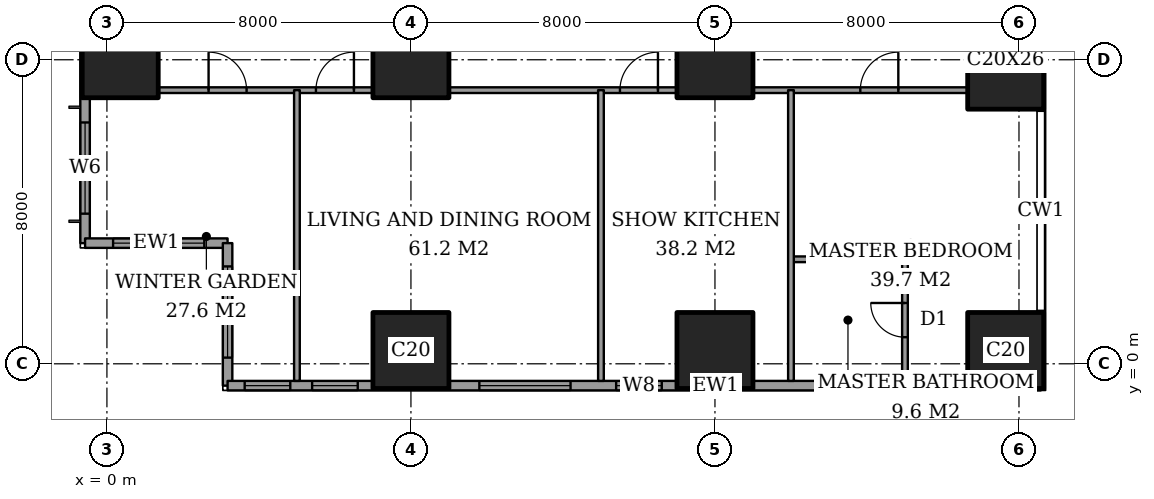
"""IFC4 building model, lengths in metres.
Left out: names, types, materials, properties, quantities, classifications, styles, units other than length and angle.
Written with IfcOpenShell. Run it as: python <this file> out.ifc"""

import sys

from ifc_helpers import new_model, si_unit, direction, frame, frame_2d, origin, origin_2d, place, context, subcontext, project, spatial, rectangle, extrude, element, fill, save


model = new_model("IFC4")
c1 = context("Model", 3, precision=1e-05, world=origin(), true_north=direction((0.0, 1.0)))
c2 = subcontext(c1, "Body", "Model", "MODEL_VIEW")
j1 = project(units=[si_unit("LENGTHUNIT", "METRE"), si_unit("PLANEANGLEUNIT", "RADIAN")], contexts=[c1])
p1 = place(None, origin())
s1 = spatial("IfcSite", under=j1, at=p1, CompositionType="ELEMENT")
p2 = place(p1, origin())
s2 = spatial("IfcBuilding", under=s1, at=p2, CompositionType="ELEMENT")
p3 = place(p2, frame((0.0, 0.0, 62.0)))
s3 = spatial("IfcBuildingStorey", under=s2, at=p3, CompositionType="ELEMENT", Elevation=62.0)
for number, where, z_axis, x_axis in (
    (1, (0.35, 8.0, 0.0), (0.0, 0.0, 1.0), (1.0, 0.0, 0.0)),
    (2, (8.0, 0.35, 0.0), (0.0, 0.0, 1.0), (1.0, 0.0, 0.0)),
    (3, (8.0, 8.0, 0.0), (0.0, 0.0, 1.0), (1.0, 0.0, 0.0)),
    (4, (16.0, 0.35, 0.0), (0.0, 0.0, 1.0), (1.0, 0.0, 0.0)),
    (5, (16.0, 8.0, 0.0), (0.0, 0.0, 1.0), (1.0, 0.0, 0.0)),
    (6, (23.65, 0.35, 0.0), (0.0, 0.0, 1.0), (1.0, 0.0, 0.0)),
):
    element("IfcColumn", number, at=place(p3, frame(where, z_axis=z_axis, x_axis=x_axis)), inside=s3, PredefinedType="COLUMN", context=c2, shape_type="SweptSolid", body=[
        extrude(rectangle(XDim=2.0, YDim=2.0, at=origin_2d()), origin(), (0.0, 0.0, 1.0), 3.6),
    ])
p4 = place(p3, frame((23.65, 8.0, 0.0), z_axis=(0.0, 0.0, 1.0), x_axis=(1.0, 0.0, 0.0)))
e7 = element("IfcColumn", 7, at=p4, inside=s3, PredefinedType="COLUMN", context=c2, shape_type="SweptSolid", body=[
    extrude(rectangle(XDim=2.0, YDim=2.6, at=origin_2d()), origin(), (0.0, 0.0, 1.0), 3.6),
])
p5 = place(p3, frame((-0.575, 44.825, 0.0), z_axis=(0.0, 0.0, 1.0), x_axis=(0.0, -1.0, 0.0)))
e8 = element("IfcWall", 8, at=p5, inside=s3, PredefinedType="SOLIDWALL", context=c2, shape_type="SweptSolid", body=[
    extrude(rectangle(XDim=41.65, YDim=0.25, at=frame_2d((20.825, 0.0))), origin(), (0.0, 0.0, 1.0), 3.6),
])
p6 = place(p5, frame((0.775, 0.0, 0.6)))
e9 = element("IfcOpeningElement", 9, at=p6, cuts=e8, PredefinedType="OPENING", context=c2, shape_type="SweptSolid", body=[
    extrude(rectangle(XDim=2.4, YDim=2.0, at=frame_2d((1.2, 1.0))), frame((0.0, 0.135, 0.0), z_axis=(0.0, -1.0, 0.0), x_axis=(1.0, 0.0, 0.0)), (0.0, 0.0, 1.0), 0.27),
])
p7 = place(p5, frame((6.1, 0.0, 0.6)))
e10 = element("IfcOpeningElement", 10, at=p7, cuts=e8, PredefinedType="OPENING", context=c2, shape_type="SweptSolid", body=[
    extrude(rectangle(XDim=1.2, YDim=2.0, at=frame_2d((0.6, 1.0))), frame((0.0, 0.135, 0.0), z_axis=(0.0, -1.0, 0.0), x_axis=(1.0, 0.0, 0.0)), (0.0, 0.0, 1.0), 0.27),
])
p8 = place(p5, frame((8.425, 0.0, 0.6)))
e11 = element("IfcOpeningElement", 11, at=p8, cuts=e8, PredefinedType="OPENING", context=c2, shape_type="SweptSolid", body=[
    extrude(rectangle(XDim=2.4, YDim=2.0, at=frame_2d((1.2, 1.0))), frame((0.0, 0.135, 0.0), z_axis=(0.0, -1.0, 0.0), x_axis=(1.0, 0.0, 0.0)), (0.0, 0.0, 1.0), 0.27),
])
p9 = place(p5, frame((15.625, 0.0, 0.6)))
e12 = element("IfcOpeningElement", 12, at=p9, cuts=e8, PredefinedType="OPENING", context=c2, shape_type="SweptSolid", body=[
    extrude(rectangle(XDim=2.4, YDim=2.0, at=frame_2d((1.2, 1.0))), frame((0.0, 0.135, 0.0), z_axis=(0.0, -1.0, 0.0), x_axis=(1.0, 0.0, 0.0)), (0.0, 0.0, 1.0), 0.27),
])
p10 = place(p5, frame((23.625, 0.0, 0.6)))
e13 = element("IfcOpeningElement", 13, at=p10, cuts=e8, PredefinedType="OPENING", context=c2, shape_type="SweptSolid", body=[
    extrude(rectangle(XDim=2.4, YDim=2.0, at=frame_2d((1.2, 1.0))), frame((0.0, 0.135, 0.0), z_axis=(0.0, -1.0, 0.0), x_axis=(1.0, 0.0, 0.0)), (0.0, 0.0, 1.0), 0.27),
])
p11 = place(p5, frame((30.825, 0.0, 0.6)))
e14 = element("IfcOpeningElement", 14, at=p11, cuts=e8, PredefinedType="OPENING", context=c2, shape_type="SweptSolid", body=[
    extrude(rectangle(XDim=2.4, YDim=2.0, at=frame_2d((1.2, 1.0))), frame((0.0, 0.135, 0.0), z_axis=(0.0, -1.0, 0.0), x_axis=(1.0, 0.0, 0.0)), (0.0, 0.0, 1.0), 0.27),
])
p12 = place(p5, frame((34.5, 0.0, 0.6)))
e15 = element("IfcOpeningElement", 15, at=p12, cuts=e8, PredefinedType="OPENING", context=c2, shape_type="SweptSolid", body=[
    extrude(rectangle(XDim=1.2, YDim=2.0, at=frame_2d((0.6, 1.0))), frame((0.0, 0.135, 0.0), z_axis=(0.0, -1.0, 0.0), x_axis=(1.0, 0.0, 0.0)), (0.0, 0.0, 1.0), 0.27),
])
p13 = place(p5, frame((38.475, 0.0, 0.6)))
e16 = element("IfcOpeningElement", 16, at=p13, cuts=e8, PredefinedType="OPENING", context=c2, shape_type="SweptSolid", body=[
    extrude(rectangle(XDim=2.4, YDim=2.0, at=frame_2d((1.2, 1.0))), frame((0.0, 0.135, 0.0), z_axis=(0.0, -1.0, 0.0), x_axis=(1.0, 0.0, 0.0)), (0.0, 0.0, 1.0), 0.27),
])
p14 = place(p3, frame((-0.575, 3.175, 0.0), z_axis=(0.0, 0.0, 1.0), x_axis=(1.0, 0.0, 0.0)))
e17 = element("IfcWall", 17, at=p14, inside=s3, PredefinedType="SOLIDWALL", context=c2, shape_type="SweptSolid", body=[
    extrude(rectangle(XDim=3.75, YDim=0.25, at=frame_2d((1.875, 0.0))), origin(), (0.0, 0.0, 1.0), 3.6),
])
p15 = place(p14, frame((0.738, 0.0, 0.6)))
e18 = element("IfcOpeningElement", 18, at=p15, cuts=e17, PredefinedType="OPENING", context=c2, shape_type="SweptSolid", body=[
    extrude(rectangle(XDim=2.4, YDim=2.0, at=frame_2d((1.2, 1.0))), frame((0.0, 0.135, 0.0), z_axis=(0.0, -1.0, 0.0), x_axis=(1.0, 0.0, 0.0)), (0.0, 0.0, 1.0), 0.27),
])
p16 = place(p3, frame((3.175, 3.175, 0.0), z_axis=(0.0, 0.0, 1.0), x_axis=(0.0, -1.0, 0.0)))
e19 = element("IfcWall", 19, at=p16, inside=s3, PredefinedType="SOLIDWALL", context=c2, shape_type="SweptSolid", body=[
    extrude(rectangle(XDim=3.75, YDim=0.25, at=frame_2d((1.875, 0.0))), origin(), (0.0, 0.0, 1.0), 3.6),
])
p17 = place(p16, frame((0.613, 0.0, 0.6)))
e20 = element("IfcOpeningElement", 20, at=p17, cuts=e19, PredefinedType="OPENING", context=c2, shape_type="SweptSolid", body=[
    extrude(rectangle(XDim=2.4, YDim=2.0, at=frame_2d((1.2, 1.0))), frame((0.0, 0.135, 0.0), z_axis=(0.0, -1.0, 0.0), x_axis=(1.0, 0.0, 0.0)), (0.0, 0.0, 1.0), 0.27),
])
p18 = place(p3, frame((3.175, -0.575, 0.0), z_axis=(0.0, 0.0, 1.0), x_axis=(1.0, 0.0, 0.0)))
e21 = element("IfcWall", 21, at=p18, inside=s3, PredefinedType="SOLIDWALL", context=c2, shape_type="SweptSolid", body=[
    extrude(rectangle(XDim=21.4, YDim=0.25, at=frame_2d((10.7, 0.0))), origin(), (0.0, 0.0, 1.0), 3.6),
])
p19 = place(p18, frame((0.45, 0.0, 0.6)))
e22 = element("IfcOpeningElement", 22, at=p19, cuts=e21, PredefinedType="OPENING", context=c2, shape_type="SweptSolid", body=[
    extrude(rectangle(XDim=1.2, YDim=2.0, at=frame_2d((0.6, 1.0))), frame((0.0, 0.135, 0.0), z_axis=(0.0, -1.0, 0.0), x_axis=(1.0, 0.0, 0.0)), (0.0, 0.0, 1.0), 0.27),
])
p20 = place(p18, frame((2.225, 0.0, 0.6)))
e23 = element("IfcOpeningElement", 23, at=p20, cuts=e21, PredefinedType="OPENING", context=c2, shape_type="SweptSolid", body=[
    extrude(rectangle(XDim=1.2, YDim=2.0, at=frame_2d((0.6, 1.0))), frame((0.0, 0.135, 0.0), z_axis=(0.0, -1.0, 0.0), x_axis=(1.0, 0.0, 0.0)), (0.0, 0.0, 1.0), 0.27),
])
p21 = place(p18, frame((6.625, 0.0, 0.6)))
e24 = element("IfcOpeningElement", 24, at=p21, cuts=e21, PredefinedType="OPENING", context=c2, shape_type="SweptSolid", body=[
    extrude(rectangle(XDim=2.4, YDim=2.0, at=frame_2d((1.2, 1.0))), frame((0.0, 0.135, 0.0), z_axis=(0.0, -1.0, 0.0), x_axis=(1.0, 0.0, 0.0)), (0.0, 0.0, 1.0), 0.27),
])
p22 = place(p18, frame((10.225, 0.0, 0.6)))
e25 = element("IfcOpeningElement", 25, at=p22, cuts=e21, PredefinedType="OPENING", context=c2, shape_type="SweptSolid", body=[
    extrude(rectangle(XDim=1.2, YDim=2.0, at=frame_2d((0.6, 1.0))), frame((0.0, 0.135, 0.0), z_axis=(0.0, -1.0, 0.0), x_axis=(1.0, 0.0, 0.0)), (0.0, 0.0, 1.0), 0.27),
])
p23 = place(p18, frame((15.725, 0.0, 0.6)))
e26 = element("IfcOpeningElement", 26, at=p23, cuts=e21, PredefinedType="OPENING", context=c2, shape_type="SweptSolid", body=[
    extrude(rectangle(XDim=1.2, YDim=2.0, at=frame_2d((0.6, 1.0))), frame((0.0, 0.135, 0.0), z_axis=(0.0, -1.0, 0.0), x_axis=(1.0, 0.0, 0.0)), (0.0, 0.0, 1.0), 0.27),
])
p24 = place(p18, frame((18.125, 0.0, 0.6)))
e27 = element("IfcOpeningElement", 27, at=p24, cuts=e21, PredefinedType="OPENING", context=c2, shape_type="SweptSolid", body=[
    extrude(rectangle(XDim=1.2, YDim=2.0, at=frame_2d((0.6, 1.0))), frame((0.0, 0.135, 0.0), z_axis=(0.0, -1.0, 0.0), x_axis=(1.0, 0.0, 0.0)), (0.0, 0.0, 1.0), 0.27),
])
p25 = place(p3, frame((18.0, 2.75, 0.0), z_axis=(0.0, 0.0, 1.0), x_axis=(1.0, 0.0, 0.0)))
e28 = element("IfcWall", 28, at=p25, inside=s3, PredefinedType="PARTITIONING", context=c2, shape_type="SweptSolid", body=[
    extrude(rectangle(XDim=3.0, YDim=0.15, at=frame_2d((1.5, 0.0))), origin(), (0.0, 0.0, 1.0), 3.35),
])
p26 = place(p3, frame((1.35, 7.2, 0.0), z_axis=(0.0, 0.0, 1.0), x_axis=(1.0, 0.0, 0.0)))
e29 = element("IfcWall", 29, at=p26, inside=s3, PredefinedType="PARTITIONING", context=c2, shape_type="SweptSolid", body=[
    extrude(rectangle(XDim=5.65, YDim=0.15, at=frame_2d((2.825, 0.0))), origin(), (0.0, 0.0, 1.0), 3.35),
])
p27 = place(p26, frame((1.325, 0.0, 0.0)))
e30 = element("IfcOpeningElement", 30, at=p27, cuts=e29, PredefinedType="OPENING", context=c2, shape_type="SweptSolid", body=[
    extrude(rectangle(XDim=1.0, YDim=2.1, at=frame_2d((0.5, 1.05))), frame((0.0, 0.085, 0.0), z_axis=(0.0, -1.0, 0.0), x_axis=(1.0, 0.0, 0.0)), (0.0, 0.0, 1.0), 0.17),
])
p28 = place(p26, frame((4.15, 0.0, 0.0)))
e31 = element("IfcOpeningElement", 31, at=p28, cuts=e29, PredefinedType="OPENING", context=c2, shape_type="SweptSolid", body=[
    extrude(rectangle(XDim=1.0, YDim=2.1, at=frame_2d((0.5, 1.05))), frame((0.0, 0.085, 0.0), z_axis=(0.0, -1.0, 0.0), x_axis=(1.0, 0.0, 0.0)), (0.0, 0.0, 1.0), 0.17),
])
p29 = place(p3, frame((9.0, 7.2, 0.0), z_axis=(0.0, 0.0, 1.0), x_axis=(1.0, 0.0, 0.0)))
e32 = element("IfcWall", 32, at=p29, inside=s3, PredefinedType="PARTITIONING", context=c2, shape_type="SweptSolid", body=[
    extrude(rectangle(XDim=6.0, YDim=0.15, at=frame_2d((3.0, 0.0))), origin(), (0.0, 0.0, 1.0), 3.35),
])
p30 = place(p29, frame((4.5, 0.0, 0.0)))
e33 = element("IfcOpeningElement", 33, at=p30, cuts=e32, PredefinedType="OPENING", context=c2, shape_type="SweptSolid", body=[
    extrude(rectangle(XDim=1.0, YDim=2.1, at=frame_2d((0.5, 1.05))), frame((0.0, 0.085, 0.0), z_axis=(0.0, -1.0, 0.0), x_axis=(1.0, 0.0, 0.0)), (0.0, 0.0, 1.0), 0.17),
])
p31 = place(p3, frame((17.0, 7.2, 0.0), z_axis=(0.0, 0.0, 1.0), x_axis=(1.0, 0.0, 0.0)))
e34 = element("IfcWall", 34, at=p31, inside=s3, PredefinedType="PARTITIONING", context=c2, shape_type="SweptSolid", body=[
    extrude(rectangle(XDim=5.65, YDim=0.15, at=frame_2d((2.825, 0.0))), origin(), (0.0, 0.0, 1.0), 3.35),
])
p32 = place(p31, frame((2.825, 0.0, 0.0)))
e35 = element("IfcOpeningElement", 35, at=p32, cuts=e34, PredefinedType="OPENING", context=c2, shape_type="SweptSolid", body=[
    extrude(rectangle(XDim=1.0, YDim=2.1, at=frame_2d((0.5, 1.05))), frame((0.0, 0.085, 0.0), z_axis=(0.0, -1.0, 0.0), x_axis=(1.0, 0.0, 0.0)), (0.0, 0.0, 1.0), 0.17),
])
for number, where, z_axis, x_axis in (
    (36, (5.0, -0.45, 0.0), (0.0, 0.0, 1.0), (0.0, 1.0, 0.0)),
    (37, (13.0, -0.45, 0.0), (0.0, 0.0, 1.0), (0.0, 1.0, 0.0)),
    (38, (18.0, -0.45, 0.0), (0.0, 0.0, 1.0), (0.0, 1.0, 0.0)),
):
    element("IfcWall", number, at=place(p3, frame(where, z_axis=z_axis, x_axis=x_axis)), inside=s3, PredefinedType="PARTITIONING", context=c2, shape_type="SweptSolid", body=[
        extrude(rectangle(XDim=7.65, YDim=0.15, at=frame_2d((3.825, 0.0))), origin(), (0.0, 0.0, 1.0), 3.35),
    ])
p33 = place(p3, frame((21.0, -0.45, 0.0), z_axis=(0.0, 0.0, 1.0), x_axis=(0.0, 1.0, 0.0)))
e39 = element("IfcWall", 39, at=p33, inside=s3, PredefinedType="PARTITIONING", context=c2, shape_type="SweptSolid", body=[
    extrude(rectangle(XDim=3.2, YDim=0.15, at=frame_2d((1.6, 0.0))), origin(), (0.0, 0.0, 1.0), 3.35),
])
p34 = place(p33, frame((1.15, 0.0, 0.0)))
e40 = element("IfcOpeningElement", 40, at=p34, cuts=e39, PredefinedType="OPENING", context=c2, shape_type="SweptSolid", body=[
    extrude(rectangle(XDim=0.9, YDim=2.1, at=frame_2d((0.45, 1.05))), frame((0.0, 0.085, 0.0), z_axis=(0.0, -1.0, 0.0), x_axis=(1.0, 0.0, 0.0)), (0.0, 0.0, 1.0), 0.17),
])
p35 = place(p13, origin())
e41 = element("IfcWindow", 41, at=p35, inside=s3, PartitioningType="SINGLE_PANEL", PredefinedType="WINDOW", context=c2, shape_type="SweptSolid", body=[
    extrude(rectangle(XDim=2.4, YDim=2.0, at=frame_2d((1.2, 1.0))), frame((0.0, 0.03, 0.0), z_axis=(0.0, -1.0, 0.0), x_axis=(1.0, 0.0, 0.0)), (0.0, 0.0, 1.0), 0.06),
])
fill(e16, e41)
p36 = place(p15, origin())
e42 = element("IfcWindow", 42, at=p36, inside=s3, PartitioningType="SINGLE_PANEL", PredefinedType="WINDOW", context=c2, shape_type="SweptSolid", body=[
    extrude(rectangle(XDim=2.4, YDim=2.0, at=frame_2d((1.2, 1.0))), frame((0.0, 0.03, 0.0), z_axis=(0.0, -1.0, 0.0), x_axis=(1.0, 0.0, 0.0)), (0.0, 0.0, 1.0), 0.06),
])
fill(e18, e42)
p37 = place(p17, origin())
e43 = element("IfcWindow", 43, at=p37, inside=s3, PartitioningType="SINGLE_PANEL", PredefinedType="WINDOW", context=c2, shape_type="SweptSolid", body=[
    extrude(rectangle(XDim=2.4, YDim=2.0, at=frame_2d((1.2, 1.0))), frame((0.0, 0.03, 0.0), z_axis=(0.0, -1.0, 0.0), x_axis=(1.0, 0.0, 0.0)), (0.0, 0.0, 1.0), 0.06),
])
fill(e20, e43)
p38 = place(p19, origin())
e44 = element("IfcWindow", 44, at=p38, inside=s3, PartitioningType="SINGLE_PANEL", PredefinedType="WINDOW", context=c2, shape_type="SweptSolid", body=[
    extrude(rectangle(XDim=1.2, YDim=2.0, at=frame_2d((0.6, 1.0))), frame((0.0, 0.03, 0.0), z_axis=(0.0, -1.0, 0.0), x_axis=(1.0, 0.0, 0.0)), (0.0, 0.0, 1.0), 0.06),
])
fill(e22, e44)
p39 = place(p20, origin())
e45 = element("IfcWindow", 45, at=p39, inside=s3, PartitioningType="SINGLE_PANEL", PredefinedType="WINDOW", context=c2, shape_type="SweptSolid", body=[
    extrude(rectangle(XDim=1.2, YDim=2.0, at=frame_2d((0.6, 1.0))), frame((0.0, 0.03, 0.0), z_axis=(0.0, -1.0, 0.0), x_axis=(1.0, 0.0, 0.0)), (0.0, 0.0, 1.0), 0.06),
])
fill(e23, e45)
p40 = place(p21, origin())
e46 = element("IfcWindow", 46, at=p40, inside=s3, PartitioningType="SINGLE_PANEL", PredefinedType="WINDOW", context=c2, shape_type="SweptSolid", body=[
    extrude(rectangle(XDim=2.4, YDim=2.0, at=frame_2d((1.2, 1.0))), frame((0.0, 0.03, 0.0), z_axis=(0.0, -1.0, 0.0), x_axis=(1.0, 0.0, 0.0)), (0.0, 0.0, 1.0), 0.06),
])
fill(e24, e46)
p41 = place(p22, origin())
e47 = element("IfcWindow", 47, at=p41, inside=s3, PartitioningType="SINGLE_PANEL", PredefinedType="WINDOW", context=c2, shape_type="SweptSolid", body=[
    extrude(rectangle(XDim=1.2, YDim=2.0, at=frame_2d((0.6, 1.0))), frame((0.0, 0.03, 0.0), z_axis=(0.0, -1.0, 0.0), x_axis=(1.0, 0.0, 0.0)), (0.0, 0.0, 1.0), 0.06),
])
fill(e25, e47)
p42 = place(p23, origin())
e48 = element("IfcWindow", 48, at=p42, inside=s3, PartitioningType="SINGLE_PANEL", PredefinedType="WINDOW", context=c2, shape_type="SweptSolid", body=[
    extrude(rectangle(XDim=1.2, YDim=2.0, at=frame_2d((0.6, 1.0))), frame((0.0, 0.03, 0.0), z_axis=(0.0, -1.0, 0.0), x_axis=(1.0, 0.0, 0.0)), (0.0, 0.0, 1.0), 0.06),
])
fill(e26, e48)
p43 = place(p24, origin())
e49 = element("IfcWindow", 49, at=p43, inside=s3, PartitioningType="SINGLE_PANEL", PredefinedType="WINDOW", context=c2, shape_type="SweptSolid", body=[
    extrude(rectangle(XDim=1.2, YDim=2.0, at=frame_2d((0.6, 1.0))), frame((0.0, 0.03, 0.0), z_axis=(0.0, -1.0, 0.0), x_axis=(1.0, 0.0, 0.0)), (0.0, 0.0, 1.0), 0.06),
])
fill(e27, e49)
p44 = place(p27, origin())
e50 = element("IfcDoor", 50, at=p44, inside=s3, OperationType="SINGLE_SWING_RIGHT", PredefinedType="DOOR", context=c2, shape_type="SweptSolid", body=[
    extrude(rectangle(XDim=1.0, YDim=2.1, at=frame_2d((0.5, 1.05))), frame((0.0, 0.025, 0.0), z_axis=(0.0, -1.0, 0.0), x_axis=(1.0, 0.0, 0.0)), (0.0, 0.0, 1.0), 0.05),
])
fill(e30, e50)
p45 = place(p28, origin())
e51 = element("IfcDoor", 51, at=p45, inside=s3, OperationType="SINGLE_SWING_LEFT", PredefinedType="DOOR", context=c2, shape_type="SweptSolid", body=[
    extrude(rectangle(XDim=1.0, YDim=2.1, at=frame_2d((0.5, 1.05))), frame((0.0, 0.025, 0.0), z_axis=(0.0, -1.0, 0.0), x_axis=(1.0, 0.0, 0.0)), (0.0, 0.0, 1.0), 0.05),
])
fill(e31, e51)
p46 = place(p30, origin())
e52 = element("IfcDoor", 52, at=p46, inside=s3, OperationType="SINGLE_SWING_LEFT", PredefinedType="DOOR", context=c2, shape_type="SweptSolid", body=[
    extrude(rectangle(XDim=1.0, YDim=2.1, at=frame_2d((0.5, 1.05))), frame((0.0, 0.025, 0.0), z_axis=(0.0, -1.0, 0.0), x_axis=(1.0, 0.0, 0.0)), (0.0, 0.0, 1.0), 0.05),
])
fill(e33, e52)
p47 = place(p34, origin())
e53 = element("IfcDoor", 53, at=p47, inside=s3, OperationType="SINGLE_SWING_LEFT", PredefinedType="DOOR", context=c2, shape_type="SweptSolid", body=[
    extrude(rectangle(XDim=0.9, YDim=2.1, at=frame_2d((0.45, 1.05))), frame((0.0, 0.025, 0.0), z_axis=(0.0, -1.0, 0.0), x_axis=(1.0, 0.0, 0.0)), (0.0, 0.0, 1.0), 0.05),
])
fill(e40, e53)
p48 = place(p32, origin())
e54 = element("IfcDoor", 54, at=p48, inside=s3, OperationType="SINGLE_SWING_LEFT", PredefinedType="DOOR", context=c2, shape_type="SweptSolid", body=[
    extrude(rectangle(XDim=1.0, YDim=2.1, at=frame_2d((0.5, 1.05))), frame((0.0, 0.025, 0.0), z_axis=(0.0, -1.0, 0.0), x_axis=(1.0, 0.0, 0.0)), (0.0, 0.0, 1.0), 0.05),
])
fill(e35, e54)
save(model, sys.argv[1])
